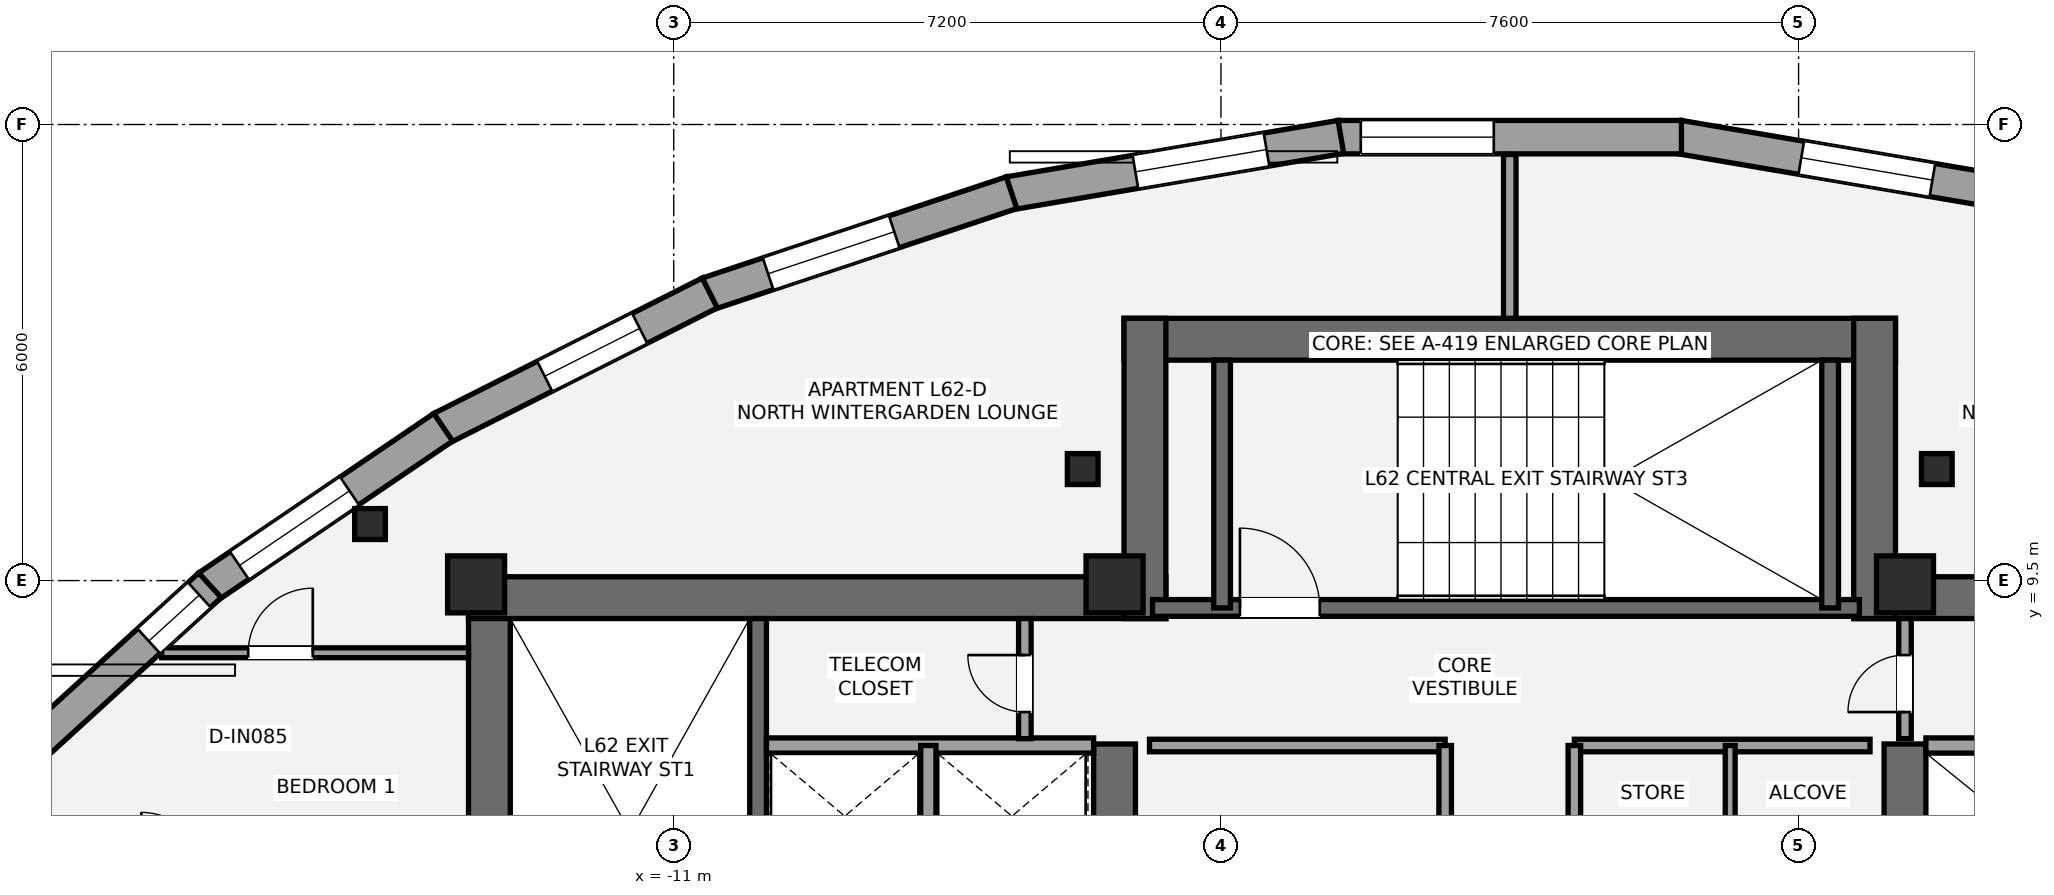
"""IFC4 building model, lengths in metres.
Left out: names, types, materials, properties, quantities, classifications, styles, units other than length and angle.
Written with IfcOpenShell. Run it as: python <this file> out.ifc"""

import sys

from ifc_helpers import new_model, si_unit, direction, frame, frame_2d, origin, origin_2d, place, context, subcontext, project, spatial, rectangle, i_section, extrude, element, fill, save


model = new_model("IFC4")
c1 = context("Model", 3, precision=1e-05, world=origin(), true_north=direction((0.0, 1.0)))
c2 = subcontext(c1, "Body", "Model", "MODEL_VIEW")
j1 = project(units=[si_unit("LENGTHUNIT", "METRE"), si_unit("PLANEANGLEUNIT", "RADIAN")], contexts=[c1])
p1 = place(None, origin())
s1 = spatial("IfcSite", under=j1, at=p1, CompositionType="ELEMENT")
p2 = place(p1, origin())
s2 = spatial("IfcBuilding", under=s1, at=p2, CompositionType="ELEMENT")
p3 = place(p2, frame((0.0, 0.0, 222.6)))
s3 = spatial("IfcBuildingStorey", under=s2, at=p3, CompositionType="ELEMENT", Elevation=222.6)
p4 = place(p3, frame((-13.425, 1.3, 0.0), z_axis=(0.0, 0.0, 1.0), x_axis=(0.0, 1.0, 0.0)))
e1 = element("IfcWall", 1, at=p4, inside=s3, PredefinedType="SHEAR", context=c2, shape_type="SweptSolid", body=[
    extrude(rectangle(XDim=8.25, YDim=0.55, at=frame_2d((4.125, 0.0))), origin(), (0.0, 0.0, 1.0), 3.15),
])
p5 = place(p3, frame((-13.7, 9.275, 0.0), z_axis=(0.0, 0.0, 1.0), x_axis=(1.0, 0.0, 0.0)))
e2 = element("IfcWall", 2, at=p5, inside=s3, PredefinedType="SHEAR", context=c2, shape_type="SweptSolid", body=[
    extrude(rectangle(XDim=9.175, YDim=0.55, at=frame_2d((4.587, 0.0))), origin(), (0.0, 0.0, 1.0), 3.15),
])
p6 = place(p3, frame((-5.2, 5.35, 0.0), z_axis=(0.0, 0.0, 1.0), x_axis=(0.0, 1.0, 0.0)))
e3 = element("IfcWall", 3, at=p6, inside=s3, PredefinedType="SHEAR", context=c2, shape_type="SweptSolid", body=[
    extrude(rectangle(XDim=2.0, YDim=0.55, at=frame_2d((1.0, 0.0))), origin(), (0.0, 0.0, 1.0), 3.15),
])
p7 = place(p3, frame((-9.89, 1.85, 0.0), z_axis=(0.0, 0.0, 1.0), x_axis=(0.0, 1.0, 0.0)))
e4 = element("IfcWall", 4, at=p7, inside=s3, PredefinedType="SHEAR", context=c2, shape_type="SweptSolid", body=[
    extrude(rectangle(XDim=7.15, YDim=0.22, at=frame_2d((3.575, 0.0))), origin(), (0.0, 0.0, 1.0), 3.15),
])
p8 = place(p3, frame((4.525, 9.275, 0.0), z_axis=(0.0, 0.0, 1.0), x_axis=(1.0, 0.0, 0.0)))
e5 = element("IfcWall", 5, at=p8, inside=s3, PredefinedType="SHEAR", context=c2, shape_type="SweptSolid", body=[
    extrude(rectangle(XDim=9.175, YDim=0.55, at=frame_2d((4.587, 0.0))), origin(), (0.0, 0.0, 1.0), 3.15),
])
p9 = place(p3, frame((5.2, 5.35, 0.0), z_axis=(0.0, 0.0, 1.0), x_axis=(0.0, 1.0, 0.0)))
e6 = element("IfcWall", 6, at=p9, inside=s3, PredefinedType="SHEAR", context=c2, shape_type="SweptSolid", body=[
    extrude(rectangle(XDim=2.0, YDim=0.55, at=frame_2d((1.0, 0.0))), origin(), (0.0, 0.0, 1.0), 3.15),
])
p10 = place(p3, frame((-5.075, 12.675, 0.0), z_axis=(0.0, 0.0, 1.0), x_axis=(1.0, 0.0, 0.0)))
e7 = element("IfcWall", 7, at=p10, inside=s3, PredefinedType="SHEAR", context=c2, shape_type="SweptSolid", body=[
    extrude(rectangle(XDim=10.15, YDim=0.55, at=frame_2d((5.075, 0.0))), origin(), (0.0, 0.0, 1.0), 3.15),
])
for number, where, z_axis, x_axis in (
    (8, (-4.8, 9.0, 0.0), (0.0, 0.0, 1.0), (0.0, 1.0, 0.0)),
    (9, (4.8, 9.0, 0.0), (0.0, 0.0, 1.0), (0.0, 1.0, 0.0)),
):
    element("IfcWall", number, at=place(p3, frame(where, z_axis=z_axis, x_axis=x_axis)), inside=s3, PredefinedType="SHEAR", context=c2, shape_type="SweptSolid", body=[
        extrude(rectangle(XDim=3.95, YDim=0.55, at=frame_2d((1.975, 0.0))), origin(), (0.0, 0.0, 1.0), 3.15),
    ])
p11 = place(p3, frame((-4.7, 9.14, 0.0), z_axis=(0.0, 0.0, 1.0), x_axis=(1.0, 0.0, 0.0)))
e10 = element("IfcWall", 10, at=p11, inside=s3, PredefinedType="SHEAR", context=c2, shape_type="SweptSolid", body=[
    extrude(rectangle(XDim=9.3, YDim=0.22, at=frame_2d((4.65, 0.0))), origin(), (0.0, 0.0, 1.0), 3.15),
])
p12 = place(p11, frame((1.15, 0.0, 0.0)))
e11 = element("IfcOpeningElement", 11, at=p12, cuts=e10, PredefinedType="OPENING", context=c2, shape_type="SweptSolid", body=[
    extrude(rectangle(XDim=1.05, YDim=2.15, at=frame_2d((0.525, 1.075))), frame((0.0, 0.12, 0.0), z_axis=(0.0, -1.0, 0.0), x_axis=(1.0, 0.0, 0.0)), (0.0, 0.0, 1.0), 0.24),
])
for number, where, z_axis, x_axis in (
    (12, (-3.785, 9.14, 0.0), (0.0, 0.0, 1.0), (0.0, 1.0, 0.0)),
    (13, (4.215, 9.14, 0.0), (0.0, 0.0, 1.0), (0.0, 1.0, 0.0)),
):
    element("IfcWall", number, at=place(p3, frame(where, z_axis=z_axis, x_axis=x_axis)), inside=s3, PredefinedType="SHEAR", context=c2, shape_type="SweptSolid", body=[
        extrude(rectangle(XDim=3.26, YDim=0.22, at=frame_2d((1.63, 0.0))), origin(), (0.0, 0.0, 1.0), 3.15),
    ])
for number, where, z_axis, x_axis in (
    (14, (-13.6, 9.45, 0.0), (0.0, 0.0, 1.0), (1.0, 0.0, 0.0)),
    (15, (-5.2, 9.45, 0.0), (0.0, 0.0, 1.0), (1.0, 0.0, 0.0)),
    (16, (5.2, 9.45, 0.0), (0.0, 0.0, 1.0), (1.0, 0.0, 0.0)),
):
    element("IfcColumn", number, at=place(p3, frame(where, z_axis=z_axis, x_axis=x_axis)), inside=s3, PredefinedType="PILASTER", context=c2, shape_type="SweptSolid", body=[
        extrude(rectangle(XDim=0.75, YDim=0.75, at=origin_2d()), origin(), (0.0, 0.0, 1.0), 3.15),
    ])
for number, where, z_axis, x_axis in (
    (17, (5.619, 10.967, 0.0), (0.0, 0.0, 1.0), (1.0, 0.0, 0.0)),
    (18, (-5.619, 10.967, 0.0), (0.0, 0.0, 1.0), (1.0, 0.0, 0.0)),
    (19, (-14.996, 10.244, 0.0), (0.0, 0.0, 1.0), (1.0, 0.0, 0.0)),
):
    element("IfcColumn", number, at=place(p3, frame(where, z_axis=z_axis, x_axis=x_axis)), inside=s3, PredefinedType="COLUMN", context=c2, shape_type="SweptSolid", body=[
        extrude(i_section(OverallWidth=0.404, OverallDepth=0.407, WebThickness=0.027, FlangeThickness=0.044, at=origin_2d()), origin(), (0.0, 0.0, 1.0), 3.15),
    ])
p13 = place(p3, frame((2.222, 15.337, 0.0), z_axis=(0.0, 0.0, 1.0), x_axis=(0.985849288176, -0.16763406874, 0.0)))
e20 = element("IfcWall", 20, at=p13, inside=s3, PredefinedType="STANDARD", context=c2, shape_type="SweptSolid", body=[
    extrude(rectangle(XDim=4.429, YDim=0.44, at=frame_2d((2.214, 0.0))), origin(), (0.0, 0.0, 1.0), 2.336),
])
p14 = place(p13, frame((1.637, 0.0, 0.55)))
e21 = element("IfcOpeningElement", 21, at=p14, cuts=e20, PredefinedType="OPENING", context=c2, shape_type="SweptSolid", body=[
    extrude(rectangle(XDim=1.75, YDim=1.55, at=frame_2d((0.875, 0.775))), frame((0.0, 0.23, 0.0), z_axis=(0.0, -1.0, 0.0), x_axis=(1.0, 0.0, 0.0)), (0.0, 0.0, 1.0), 0.46),
])
p15 = place(p3, frame((-2.259, 15.334, 0.0), z_axis=(0.0, 0.0, 1.0), x_axis=(1.0, 0.0, 0.0)))
e22 = element("IfcWall", 22, at=p15, inside=s3, PredefinedType="STANDARD", context=c2, shape_type="SweptSolid", body=[
    extrude(rectangle(XDim=4.518, YDim=0.44, at=frame_2d((2.259, 0.0))), origin(), (0.0, 0.0, 1.0), 2.336),
])
p16 = place(p15, frame((0.299, 0.0, 0.55)))
e23 = element("IfcOpeningElement", 23, at=p16, cuts=e22, PredefinedType="OPENING", context=c2, shape_type="SweptSolid", body=[
    extrude(rectangle(XDim=1.75, YDim=1.55, at=frame_2d((0.875, 0.775))), frame((0.0, 0.23, 0.0), z_axis=(0.0, -1.0, 0.0), x_axis=(1.0, 0.0, 0.0)), (0.0, 0.0, 1.0), 0.46),
])
p17 = place(p3, frame((-6.588, 14.594, 0.0), z_axis=(0.0, 0.0, 1.0), x_axis=(0.985849288176, 0.16763406874, 0.0)))
e24 = element("IfcWall", 24, at=p17, inside=s3, PredefinedType="STANDARD", context=c2, shape_type="SweptSolid", body=[
    extrude(rectangle(XDim=4.429, YDim=0.44, at=frame_2d((2.214, 0.0))), origin(), (0.0, 0.0, 1.0), 2.336),
])
p18 = place(p17, frame((1.686, 0.0, 0.55)))
e25 = element("IfcOpeningElement", 25, at=p18, cuts=e24, PredefinedType="OPENING", context=c2, shape_type="SweptSolid", body=[
    extrude(rectangle(XDim=1.75, YDim=1.55, at=frame_2d((0.875, 0.775))), frame((0.0, 0.23, 0.0), z_axis=(0.0, -1.0, 0.0), x_axis=(1.0, 0.0, 0.0)), (0.0, 0.0, 1.0), 0.46),
])
p19 = place(p3, frame((-10.555, 13.271, 0.0), z_axis=(0.0, 0.0, 1.0), x_axis=(0.948810648135, 0.315845459024, 0.0)))
e26 = element("IfcWall", 26, at=p19, inside=s3, PredefinedType="STANDARD", context=c2, shape_type="SweptSolid", body=[
    extrude(rectangle(XDim=4.215, YDim=0.44, at=frame_2d((2.107, 0.0))), origin(), (0.0, 0.0, 1.0), 2.336),
])
p20 = place(p19, frame((0.839, 0.0, 0.55)))
e27 = element("IfcOpeningElement", 27, at=p20, cuts=e26, PredefinedType="OPENING", context=c2, shape_type="SweptSolid", body=[
    extrude(rectangle(XDim=1.75, YDim=1.55, at=frame_2d((0.875, 0.775))), frame((0.0, 0.23, 0.0), z_axis=(0.0, -1.0, 0.0), x_axis=(1.0, 0.0, 0.0)), (0.0, 0.0, 1.0), 0.46),
])
p21 = place(p3, frame((-14.057, 11.502, 0.0), z_axis=(0.0, 0.0, 1.0), x_axis=(0.892866610217, 0.450321236851, 0.0)))
e28 = element("IfcWall", 28, at=p21, inside=s3, PredefinedType="STANDARD", context=c2, shape_type="SweptSolid", body=[
    extrude(rectangle(XDim=3.956, YDim=0.44, at=frame_2d((1.978, 0.0))), origin(), (0.0, 0.0, 1.0), 2.336),
])
p22 = place(p21, frame((1.523, 0.0, 0.55)))
e29 = element("IfcOpeningElement", 29, at=p22, cuts=e28, PredefinedType="OPENING", context=c2, shape_type="SweptSolid", body=[
    extrude(rectangle(XDim=1.4, YDim=1.55, at=frame_2d((0.7, 0.775))), frame((0.0, 0.23, 0.0), z_axis=(0.0, -1.0, 0.0), x_axis=(1.0, 0.0, 0.0)), (0.0, 0.0, 1.0), 0.46),
])
p23 = place(p3, frame((-17.126, 9.419, 0.0), z_axis=(0.0, 0.0, 1.0), x_axis=(0.827642668093, 0.561255391023, 0.0)))
e30 = element("IfcWall", 30, at=p23, inside=s3, PredefinedType="STANDARD", context=c2, shape_type="SweptSolid", body=[
    extrude(rectangle(XDim=3.738, YDim=0.44, at=frame_2d((1.869, 0.0))), origin(), (0.0, 0.0, 1.0), 2.336),
])
p24 = place(p23, frame((0.498, 0.0, 0.55)))
e31 = element("IfcOpeningElement", 31, at=p24, cuts=e30, PredefinedType="OPENING", context=c2, shape_type="SweptSolid", body=[
    extrude(rectangle(XDim=1.75, YDim=1.55, at=frame_2d((0.875, 0.775))), frame((0.0, 0.23, 0.0), z_axis=(0.0, -1.0, 0.0), x_axis=(1.0, 0.0, 0.0)), (0.0, 0.0, 1.0), 0.46),
])
p25 = place(p3, frame((-19.728, 7.042, 0.0), z_axis=(0.0, 0.0, 1.0), x_axis=(0.738907573949, 0.673806795129, 0.0)))
e32 = element("IfcWall", 32, at=p25, inside=s3, PredefinedType="STANDARD", context=c2, shape_type="SweptSolid", body=[
    extrude(rectangle(XDim=3.555, YDim=0.44, at=frame_2d((1.778, 0.0))), origin(), (0.0, 0.0, 1.0), 2.336),
])
p26 = place(p25, frame((2.466, 0.0, 0.58)))
e33 = element("IfcOpeningElement", 33, at=p26, cuts=e32, PredefinedType="OPENING", context=c2, shape_type="SweptSolid", body=[
    extrude(rectangle(XDim=0.9, YDim=1.35, at=frame_2d((0.45, 0.675))), frame((0.0, 0.23, 0.0), z_axis=(0.0, -1.0, 0.0), x_axis=(1.0, 0.0, 0.0)), (0.0, 0.0, 1.0), 0.46),
])
p27 = place(p3, frame((-9.78, 7.33, 0.0), z_axis=(0.0, 0.0, 1.0), x_axis=(1.0, 0.0, 0.0)))
e34 = element("IfcWall", 34, at=p27, inside=s3, PredefinedType="SOLIDWALL", context=c2, shape_type="SweptSolid", body=[
    extrude(rectangle(XDim=4.305, YDim=0.2, at=frame_2d((2.152, 0.0))), origin(), (0.0, 0.0, 1.0), 2.97),
])
p28 = place(p3, frame((-7.65, 5.47, 0.0), z_axis=(0.0, 0.0, 1.0), x_axis=(0.0, 1.0, 0.0)))
e35 = element("IfcWall", 35, at=p28, inside=s3, PredefinedType="SOLIDWALL", context=c2, shape_type="SweptSolid", body=[
    extrude(rectangle(XDim=1.86, YDim=0.2, at=frame_2d((0.93, 0.0))), origin(), (0.0, 0.0, 1.0), 2.97),
])
p29 = place(p3, frame((5.475, 7.33, 0.0), z_axis=(0.0, 0.0, 1.0), x_axis=(1.0, 0.0, 0.0)))
e36 = element("IfcWall", 36, at=p29, inside=s3, PredefinedType="SOLIDWALL", context=c2, shape_type="SweptSolid", body=[
    extrude(rectangle(XDim=4.305, YDim=0.2, at=frame_2d((2.152, 0.0))), origin(), (0.0, 0.0, 1.0), 2.97),
])
p30 = place(p3, frame((-4.74, 7.33, 0.0), z_axis=(0.0, 0.0, 1.0), x_axis=(1.0, 0.0, 0.0)))
e37 = element("IfcWall", 37, at=p30, inside=s3, PredefinedType="PARTITIONING", context=c2, shape_type="SweptSolid", body=[
    extrude(rectangle(XDim=3.89, YDim=0.165, at=frame_2d((1.945, 0.0))), origin(), (0.0, 0.0, 1.0), 2.97),
])
p31 = place(p3, frame((-0.85, 5.52, 0.0), z_axis=(0.0, 0.0, 1.0), x_axis=(0.0, 1.0, 0.0)))
e38 = element("IfcWall", 38, at=p31, inside=s3, PredefinedType="PARTITIONING", context=c2, shape_type="SweptSolid", body=[
    extrude(rectangle(XDim=1.81, YDim=0.165, at=frame_2d((0.905, 0.0))), origin(), (0.0, 0.0, 1.0), 2.97),
])
p32 = place(p3, frame((0.85, 7.33, 0.0), z_axis=(0.0, 0.0, 1.0), x_axis=(1.0, 0.0, 0.0)))
e39 = element("IfcWall", 39, at=p32, inside=s3, PredefinedType="PARTITIONING", context=c2, shape_type="SweptSolid", body=[
    extrude(rectangle(XDim=3.89, YDim=0.165, at=frame_2d((1.945, 0.0))), origin(), (0.0, 0.0, 1.0), 2.97),
])
p33 = place(p3, frame((0.85, 5.52, 0.0), z_axis=(0.0, 0.0, 1.0), x_axis=(0.0, 1.0, 0.0)))
e40 = element("IfcWall", 40, at=p33, inside=s3, PredefinedType="PARTITIONING", context=c2, shape_type="SweptSolid", body=[
    extrude(rectangle(XDim=1.81, YDim=0.165, at=frame_2d((0.905, 0.0))), origin(), (0.0, 0.0, 1.0), 2.97),
])
p34 = place(p3, frame((2.9, 5.52, 0.0), z_axis=(0.0, 0.0, 1.0), x_axis=(0.0, 1.0, 0.0)))
e41 = element("IfcWall", 41, at=p34, inside=s3, PredefinedType="PARTITIONING", context=c2, shape_type="SweptSolid", body=[
    extrude(rectangle(XDim=1.81, YDim=0.13, at=frame_2d((0.905, 0.0))), origin(), (0.0, 0.0, 1.0), 2.97),
])
p35 = place(p3, frame((-6.38, 7.42, 0.0), z_axis=(0.0, 0.0, 1.0), x_axis=(0.0, 1.0, 0.0)))
e42 = element("IfcWall", 42, at=p35, inside=s3, PredefinedType="PARTITIONING", context=c2, shape_type="SweptSolid", body=[
    extrude(rectangle(XDim=1.58, YDim=0.165, at=frame_2d((0.79, 0.0))), origin(), (0.0, 0.0, 1.0), 2.97),
])
p36 = place(p35, frame((0.35, 0.0, 0.0)))
e43 = element("IfcOpeningElement", 43, at=p36, cuts=e42, PredefinedType="OPENING", context=c2, shape_type="SweptSolid", body=[
    extrude(rectangle(XDim=0.75, YDim=2.1, at=frame_2d((0.375, 1.05))), frame((0.0, 0.093, 0.0), z_axis=(0.0, -1.0, 0.0), x_axis=(1.0, 0.0, 0.0)), (0.0, 0.0, 1.0), 0.185),
])
p37 = place(p3, frame((5.2, 7.42, 0.0), z_axis=(0.0, 0.0, 1.0), x_axis=(0.0, 1.0, 0.0)))
e44 = element("IfcWall", 44, at=p37, inside=s3, PredefinedType="PARTITIONING", context=c2, shape_type="SweptSolid", body=[
    extrude(rectangle(XDim=1.58, YDim=0.165, at=frame_2d((0.79, 0.0))), origin(), (0.0, 0.0, 1.0), 2.97),
])
p38 = place(p37, frame((0.35, 0.0, 0.0)))
e45 = element("IfcOpeningElement", 45, at=p38, cuts=e44, PredefinedType="OPENING", context=c2, shape_type="SweptSolid", body=[
    extrude(rectangle(XDim=0.75, YDim=2.1, at=frame_2d((0.375, 1.05))), frame((0.0, 0.093, 0.0), z_axis=(0.0, -1.0, 0.0), x_axis=(1.0, 0.0, 0.0)), (0.0, 0.0, 1.0), 0.185),
])
p39 = place(p3, frame((0.0, 12.95, 0.0), z_axis=(0.0, 0.0, 1.0), x_axis=(0.0, 1.0, 0.0)))
e46 = element("IfcWall", 46, at=p39, inside=s3, PredefinedType="PARTITIONING", context=c2, shape_type="SweptSolid", body=[
    extrude(rectangle(XDim=2.156, YDim=0.165, at=frame_2d((1.078, 0.0))), origin(), (0.0, 0.0, 1.0), 2.97),
])
p40 = place(p3, frame((-17.737, 8.55, 0.0), z_axis=(0.0, 0.0, 1.0), x_axis=(1.0, 0.0, 0.0)))
e47 = element("IfcWall", 47, at=p40, inside=s3, PredefinedType="PARTITIONING", context=c2, shape_type="SweptSolid", body=[
    extrude(rectangle(XDim=4.037, YDim=0.13, at=frame_2d((2.019, 0.0))), origin(), (0.0, 0.0, 1.0), 2.423),
])
p41 = place(p40, frame((1.138, 0.0, 0.0)))
e48 = element("IfcOpeningElement", 48, at=p41, cuts=e47, PredefinedType="OPENING", context=c2, shape_type="SweptSolid", body=[
    extrude(rectangle(XDim=0.85, YDim=2.1, at=frame_2d((0.425, 1.05))), frame((0.0, 0.075, 0.0), z_axis=(0.0, -1.0, 0.0), x_axis=(1.0, 0.0, 0.0)), (0.0, 0.0, 1.0), 0.15),
])
p42 = place(p14, origin())
e49 = element("IfcWindow", 49, at=p42, inside=s3, PartitioningType="SINGLE_PANEL", PredefinedType="WINDOW", context=c2, shape_type="SweptSolid", body=[
    extrude(rectangle(XDim=1.75, YDim=1.55, at=frame_2d((0.875, 0.775))), frame((0.0, -0.01, 0.0), z_axis=(0.0, -1.0, 0.0), x_axis=(1.0, 0.0, 0.0)), (0.0, 0.0, 1.0), 0.06),
])
fill(e21, e49)
p43 = place(p16, origin())
e50 = element("IfcWindow", 50, at=p43, inside=s3, PartitioningType="SINGLE_PANEL", PredefinedType="WINDOW", context=c2, shape_type="SweptSolid", body=[
    extrude(rectangle(XDim=1.75, YDim=1.55, at=frame_2d((0.875, 0.775))), frame((0.0, -0.01, 0.0), z_axis=(0.0, -1.0, 0.0), x_axis=(1.0, 0.0, 0.0)), (0.0, 0.0, 1.0), 0.06),
])
fill(e23, e50)
p44 = place(p18, origin())
e51 = element("IfcWindow", 51, at=p44, inside=s3, PartitioningType="SINGLE_PANEL", PredefinedType="WINDOW", context=c2, shape_type="SweptSolid", body=[
    extrude(rectangle(XDim=1.75, YDim=1.55, at=frame_2d((0.875, 0.775))), frame((0.0, -0.01, 0.0), z_axis=(0.0, -1.0, 0.0), x_axis=(1.0, 0.0, 0.0)), (0.0, 0.0, 1.0), 0.06),
])
fill(e25, e51)
p45 = place(p20, origin())
e52 = element("IfcWindow", 52, at=p45, inside=s3, PartitioningType="SINGLE_PANEL", PredefinedType="WINDOW", context=c2, shape_type="SweptSolid", body=[
    extrude(rectangle(XDim=1.75, YDim=1.55, at=frame_2d((0.875, 0.775))), frame((0.0, -0.01, 0.0), z_axis=(0.0, -1.0, 0.0), x_axis=(1.0, 0.0, 0.0)), (0.0, 0.0, 1.0), 0.06),
])
fill(e27, e52)
p46 = place(p22, origin())
e53 = element("IfcWindow", 53, at=p46, inside=s3, PartitioningType="SINGLE_PANEL", PredefinedType="WINDOW", context=c2, shape_type="SweptSolid", body=[
    extrude(rectangle(XDim=1.4, YDim=1.55, at=frame_2d((0.7, 0.775))), frame((0.0, -0.01, 0.0), z_axis=(0.0, -1.0, 0.0), x_axis=(1.0, 0.0, 0.0)), (0.0, 0.0, 1.0), 0.06),
])
fill(e29, e53)
p47 = place(p24, origin())
e54 = element("IfcWindow", 54, at=p47, inside=s3, PartitioningType="SINGLE_PANEL", PredefinedType="WINDOW", context=c2, shape_type="SweptSolid", body=[
    extrude(rectangle(XDim=1.75, YDim=1.55, at=frame_2d((0.875, 0.775))), frame((0.0, -0.01, 0.0), z_axis=(0.0, -1.0, 0.0), x_axis=(1.0, 0.0, 0.0)), (0.0, 0.0, 1.0), 0.06),
])
fill(e31, e54)
p48 = place(p26, origin())
e55 = element("IfcWindow", 55, at=p48, inside=s3, PartitioningType="SINGLE_PANEL", PredefinedType="WINDOW", context=c2, shape_type="SweptSolid", body=[
    extrude(rectangle(XDim=0.9, YDim=1.35, at=frame_2d((0.45, 0.675))), frame((0.0, -0.01, 0.0), z_axis=(0.0, -1.0, 0.0), x_axis=(1.0, 0.0, 0.0)), (0.0, 0.0, 1.0), 0.06),
])
fill(e33, e55)
p49 = place(p12, origin())
e56 = element("IfcDoor", 56, at=p49, inside=s3, OperationType="SINGLE_SWING_LEFT", PredefinedType="DOOR", context=c2, shape_type="SweptSolid", body=[
    extrude(rectangle(XDim=1.05, YDim=2.15, at=frame_2d((0.525, 1.075))), frame((0.0, 0.025, 0.0), z_axis=(0.0, -1.0, 0.0), x_axis=(1.0, 0.0, 0.0)), (0.0, 0.0, 1.0), 0.05),
])
fill(e11, e56)
p50 = place(p36, origin())
e57 = element("IfcDoor", 57, at=p50, inside=s3, OperationType="SINGLE_SWING_RIGHT", PredefinedType="DOOR", context=c2, shape_type="SweptSolid", body=[
    extrude(rectangle(XDim=0.75, YDim=2.1, at=frame_2d((0.375, 1.05))), frame((0.0, 0.025, 0.0), z_axis=(0.0, -1.0, 0.0), x_axis=(1.0, 0.0, 0.0)), (0.0, 0.0, 1.0), 0.05),
])
fill(e43, e57)
p51 = place(p38, origin())
e58 = element("IfcDoor", 58, at=p51, inside=s3, OperationType="SINGLE_SWING_LEFT", PredefinedType="DOOR", context=c2, shape_type="SweptSolid", body=[
    extrude(rectangle(XDim=0.75, YDim=2.1, at=frame_2d((0.375, 1.05))), frame((0.0, 0.025, 0.0), z_axis=(0.0, -1.0, 0.0), x_axis=(1.0, 0.0, 0.0)), (0.0, 0.0, 1.0), 0.05),
])
fill(e45, e58)
p52 = place(p41, origin())
e59 = element("IfcDoor", 59, at=p52, inside=s3, OperationType="SINGLE_SWING_RIGHT", PredefinedType="DOOR", context=c2, shape_type="SweptSolid", body=[
    extrude(rectangle(XDim=0.85, YDim=2.1, at=frame_2d((0.425, 1.05))), frame((0.0, 0.025, 0.0), z_axis=(0.0, -1.0, 0.0), x_axis=(1.0, 0.0, 0.0)), (0.0, 0.0, 1.0), 0.05),
])
fill(e48, e59)
save(model, sys.argv[1])
